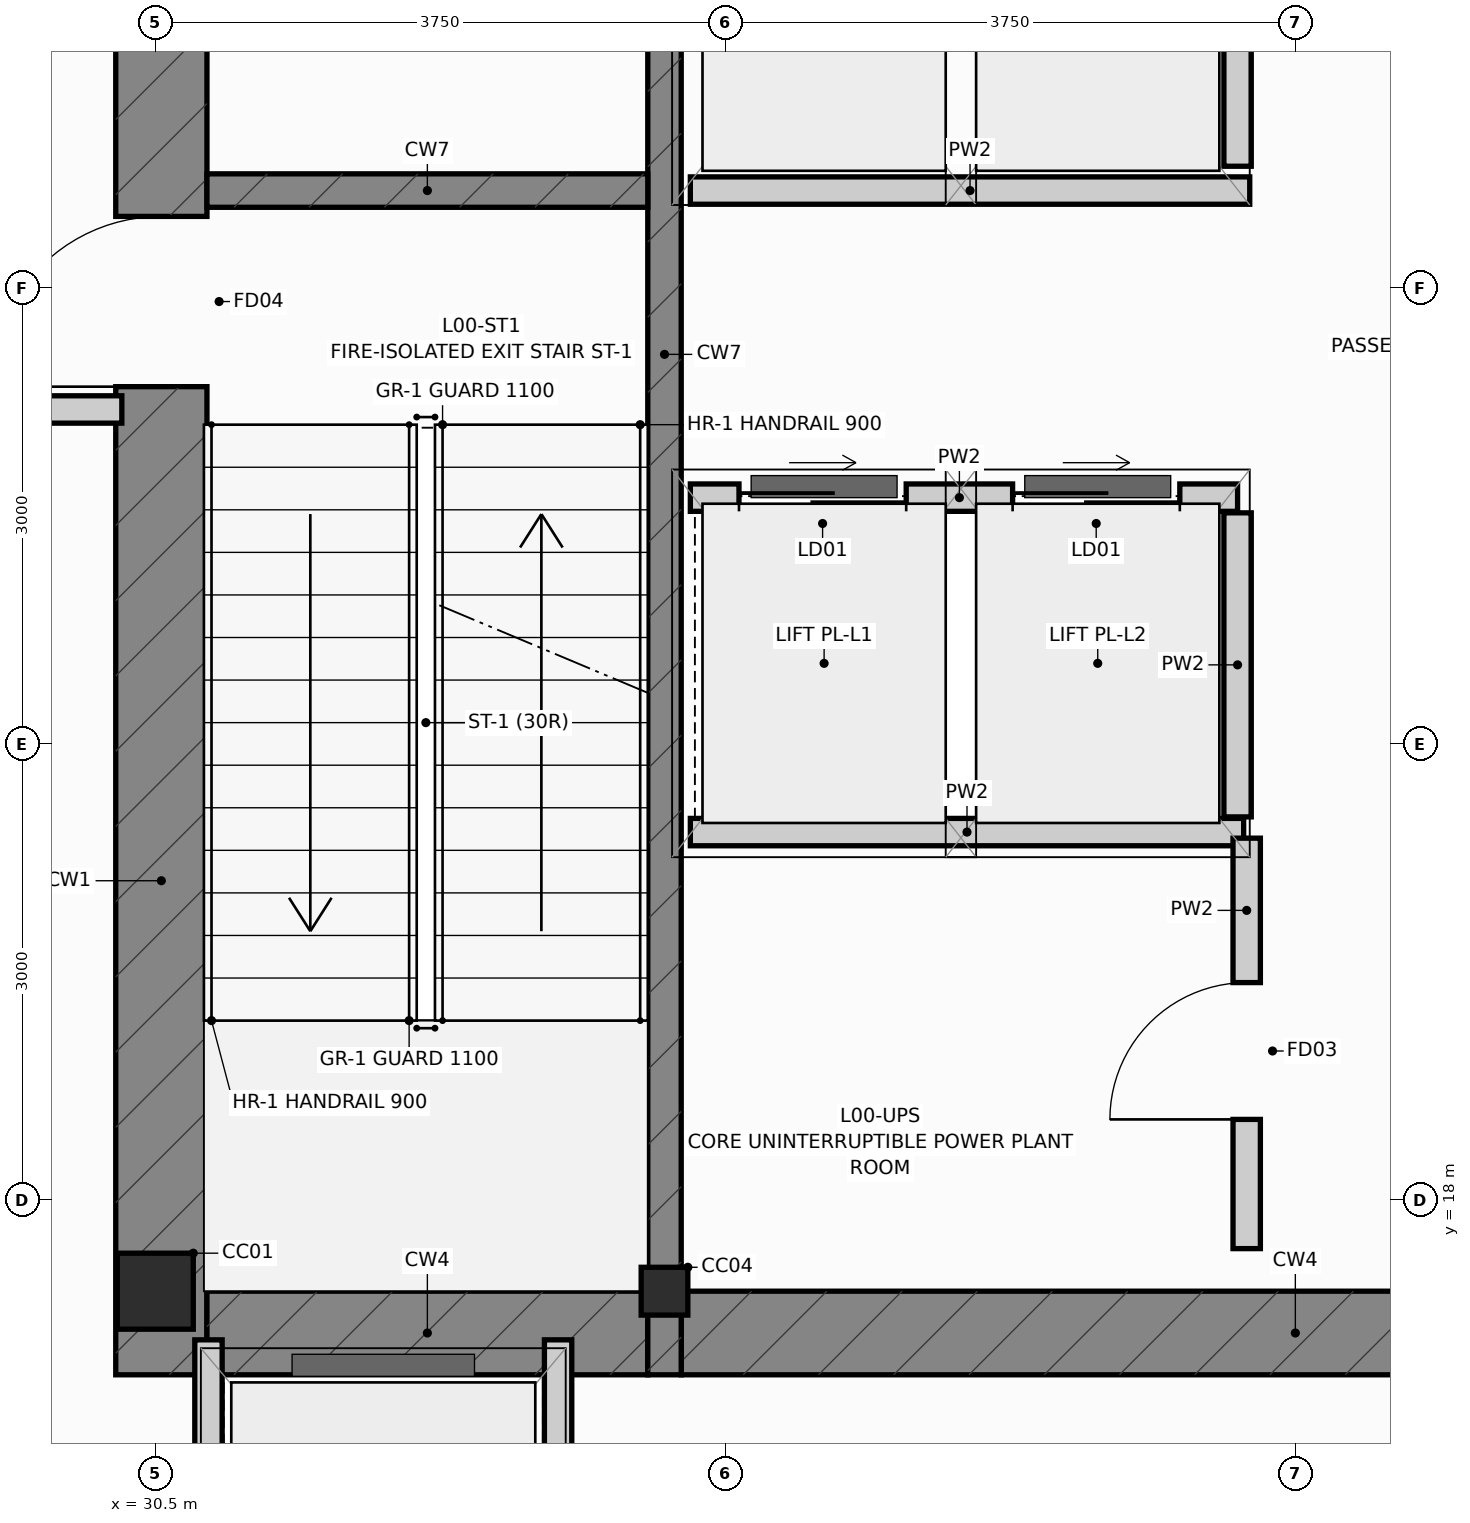
"""IFC4 building model, lengths in metres.
Left out: names, types, materials, properties, quantities, classifications, styles, units other than length and angle.
Written with IfcOpenShell. Run it as: python <this file> out.ifc"""

import sys

from ifc_helpers import new_model, si_unit, direction, frame, frame_2d, origin, origin_2d, place, context, subcontext, project, spatial, rectangle, i_section, extrude, source, transform, mapped, element, fill, save


model = new_model("IFC4")
c1 = context("Model", 3, precision=1e-05, world=origin(), true_north=direction((0.0, 1.0)))
c2 = subcontext(c1, "Body", "Model", "MODEL_VIEW")
j1 = project(units=[si_unit("LENGTHUNIT", "METRE"), si_unit("PLANEANGLEUNIT", "RADIAN")], contexts=[c1])
p1 = place(None, origin())
s1 = spatial("IfcSite", under=j1, at=p1, CompositionType="ELEMENT")
p2 = place(p1, origin())
s2 = spatial("IfcBuilding", under=s1, at=p2, CompositionType="ELEMENT")
p3 = place(p2, origin())
s3 = spatial("IfcBuildingStorey", under=s2, at=p3, CompositionType="ELEMENT", Elevation=0.0)
m1 = source(origin(), c2, "Body", "SweptSolid", [
    extrude(i_section(OverallWidth=0.5, OverallDepth=0.5, WebThickness=0.028, FlangeThickness=0.04, at=origin_2d()), origin(), (0.0, 0.0, 1.0), 5.4),
])
p4 = place(p3, frame((30.5, 17.4, 0.0), z_axis=(0.0, 0.0, 1.0), x_axis=(1.0, 0.0, 0.0)))
e1 = element("IfcColumn", 1, at=p4, inside=s3, PredefinedType="COLUMN", context=c2, shape_type="MappedRepresentation", body=[
    mapped(m1, transform((0.0, 0.0, 0.0), scale=1.0)),
])
m2 = source(origin(), c2, "Body", "SweptSolid", [
    extrude(i_section(OverallWidth=0.307, OverallDepth=0.315, WebThickness=0.012, FlangeThickness=0.019, at=origin_2d()), origin(), (0.0, 0.0, 1.0), 5.4),
])
p5 = place(p3, frame((33.85, 17.4, 0.0), z_axis=(0.0, 0.0, 1.0), x_axis=(1.0, 0.0, 0.0)))
e2 = element("IfcColumn", 2, at=p5, inside=s3, PredefinedType="COLUMN", context=c2, shape_type="MappedRepresentation", body=[
    mapped(m2, transform((0.0, 0.0, 0.0), scale=1.0)),
])
p6 = place(p3, frame((30.54, 16.85, 0.0), z_axis=(0.0, 0.0, 1.0), x_axis=(0.0, 1.0, 0.0)))
e3 = element("IfcWall", 3, at=p6, inside=s3, PredefinedType="SHEAR", context=c2, shape_type="SweptSolid", body=[
    extrude(rectangle(XDim=13.425, YDim=0.6, at=frame_2d((6.712, 0.0))), origin(), (0.0, 0.0, 1.0), 5.4),
])
p7 = place(p6, frame((6.5, 0.0, 0.0)))
e4 = element("IfcOpeningElement", 4, at=p7, cuts=e3, PredefinedType="OPENING", context=c2, shape_type="SweptSolid", body=[
    extrude(rectangle(XDim=1.12, YDim=2.15, at=frame_2d((0.56, 1.075))), frame((0.0, 0.312, 0.0), z_axis=(0.0, -1.0, 0.0), x_axis=(1.0, 0.0, 0.0)), (0.0, 0.0, 1.0), 0.624),
])
p8 = place(p6, frame((10.95, 0.0, 0.0)))
e5 = element("IfcOpeningElement", 5, at=p8, cuts=e3, PredefinedType="OPENING", context=c2, shape_type="SweptSolid", body=[
    extrude(rectangle(XDim=1.2, YDim=2.2, at=frame_2d((0.6, 1.1))), frame((0.0, 0.312, 0.0), z_axis=(0.0, -1.0, 0.0), x_axis=(1.0, 0.0, 0.0)), (0.0, 0.0, 1.0), 0.624),
])
p9 = place(p3, frame((30.84, 17.125, 0.0), z_axis=(0.0, 0.0, 1.0), x_axis=(1.0, 0.0, 0.0)))
e6 = element("IfcWall", 6, at=p9, inside=s3, PredefinedType="SHEAR", context=c2, shape_type="SweptSolid", body=[
    extrude(rectangle(XDim=2.9, YDim=0.55, at=frame_2d((1.45, 0.0))), origin(), (0.0, 0.0, 1.0), 5.4),
])
p10 = place(p3, frame((33.96, 17.125, 0.0), z_axis=(0.0, 0.0, 1.0), x_axis=(1.0, 0.0, 0.0)))
e7 = element("IfcWall", 7, at=p10, inside=s3, PredefinedType="SHEAR", context=c2, shape_type="SweptSolid", body=[
    extrude(rectangle(XDim=8.08, YDim=0.55, at=frame_2d((4.04, 0.0))), origin(), (0.0, 0.0, 1.0), 5.4),
])
p11 = place(p3, frame((33.85, 16.85, 0.0), z_axis=(0.0, 0.0, 1.0), x_axis=(0.0, 1.0, 0.0)))
e8 = element("IfcWall", 8, at=p11, inside=s3, PredefinedType="SHEAR", context=c2, shape_type="SweptSolid", body=[
    extrude(rectangle(XDim=13.425, YDim=0.22, at=frame_2d((6.712, 0.0))), origin(), (0.0, 0.0, 1.0), 5.4),
])
p12 = place(p3, frame((30.84, 24.64, 0.0), z_axis=(0.0, 0.0, 1.0), x_axis=(1.0, 0.0, 0.0)))
e9 = element("IfcWall", 9, at=p12, inside=s3, PredefinedType="SHEAR", context=c2, shape_type="SweptSolid", body=[
    extrude(rectangle(XDim=2.9, YDim=0.22, at=frame_2d((1.45, 0.0))), origin(), (0.0, 0.0, 1.0), 5.4),
])
p13 = place(p3, frame((30.85, 14.42, 0.0), z_axis=(0.0, 0.0, 1.0), x_axis=(0.0, 1.0, 0.0)))
e10 = element("IfcWall", 10, at=p13, inside=s3, PredefinedType="PARTITIONING", context=c2, shape_type="SweptSolid", body=[
    extrude(rectangle(XDim=2.66, YDim=0.18, at=frame_2d((1.33, 0.0))), origin(), (0.0, 0.0, 1.0), 4.453),
])
p14 = place(p3, frame((33.15, 14.42, 0.0), z_axis=(0.0, 0.0, 1.0), x_axis=(0.0, 1.0, 0.0)))
e11 = element("IfcWall", 11, at=p14, inside=s3, PredefinedType="PARTITIONING", context=c2, shape_type="SweptSolid", body=[
    extrude(rectangle(XDim=2.66, YDim=0.18, at=frame_2d((1.33, 0.0))), origin(), (0.0, 0.0, 1.0), 5.08),
])
p15 = place(p3, frame((34.02, 22.62, 0.0), z_axis=(0.0, 0.0, 1.0), x_axis=(1.0, 0.0, 0.0)))
e12 = element("IfcWall", 12, at=p15, inside=s3, PredefinedType="PARTITIONING", context=c2, shape_type="SweptSolid", body=[
    extrude(rectangle(XDim=3.6, YDim=0.18, at=frame_2d((1.8, 0.0))), origin(), (0.0, 0.0, 1.0), 5.08),
])
p16 = place(p15, frame((0.32, 0.0, 0.0)))
e13 = element("IfcOpeningElement", 13, at=p16, cuts=e12, PredefinedType="OPENING", context=c2, shape_type="SweptSolid", body=[
    extrude(rectangle(XDim=1.1, YDim=2.2, at=frame_2d((0.55, 1.1))), frame((0.0, 0.102, 0.0), z_axis=(0.0, -1.0, 0.0), x_axis=(1.0, 0.0, 0.0)), (0.0, 0.0, 1.0), 0.204),
])
p17 = place(p15, frame((2.12, 0.0, 0.0)))
e14 = element("IfcOpeningElement", 14, at=p17, cuts=e12, PredefinedType="OPENING", context=c2, shape_type="SweptSolid", body=[
    extrude(rectangle(XDim=1.1, YDim=2.2, at=frame_2d((0.55, 1.1))), frame((0.0, 0.102, 0.0), z_axis=(0.0, -1.0, 0.0), x_axis=(1.0, 0.0, 0.0)), (0.0, 0.0, 1.0), 0.204),
])
for number, where, z_axis, x_axis in (
    (15, (37.62, 20.52, 0.0), (0.0, 0.0, 1.0), (0.0, 1.0, 0.0)),
    (16, (37.62, 24.8, 0.0), (0.0, 0.0, 1.0), (0.0, 1.0, 0.0)),
):
    element("IfcWall", number, at=place(p3, frame(where, z_axis=z_axis, x_axis=x_axis)), inside=s3, PredefinedType="PARTITIONING", context=c2, shape_type="SweptSolid", body=[
        extrude(rectangle(XDim=2.0, YDim=0.18, at=frame_2d((1.0, 0.0))), origin(), (0.0, 0.0, 1.0), 5.08),
    ])
p18 = place(p3, frame((34.02, 24.64, 0.0), z_axis=(0.0, 0.0, 1.0), x_axis=(1.0, 0.0, 0.0)))
e17 = element("IfcWall", 17, at=p18, inside=s3, PredefinedType="PARTITIONING", context=c2, shape_type="SweptSolid", body=[
    extrude(rectangle(XDim=3.68, YDim=0.18, at=frame_2d((1.84, 0.0))), origin(), (0.0, 0.0, 1.0), 5.08),
])
p19 = place(p3, frame((27.52, 23.2, 0.0), z_axis=(0.0, 0.0, 1.0), x_axis=(1.0, 0.0, 0.0)))
e18 = element("IfcWall", 18, at=p19, inside=s3, PredefinedType="PARTITIONING", context=c2, shape_type="SweptSolid", body=[
    extrude(rectangle(XDim=2.76, YDim=0.18, at=frame_2d((1.38, 0.0))), origin(), (0.0, 0.0, 1.0), 5.08),
])
p20 = place(p3, frame((34.02, 20.42, 0.0), z_axis=(0.0, 0.0, 1.0), x_axis=(1.0, 0.0, 0.0)))
e19 = element("IfcWall", 19, at=p20, inside=s3, PredefinedType="PARTITIONING", context=c2, shape_type="SweptSolid", body=[
    extrude(rectangle(XDim=3.64, YDim=0.18, at=frame_2d((1.82, 0.0))), origin(), (0.0, 0.0, 1.0), 5.08),
])
p21 = place(p3, frame((37.68, 17.68, 0.0), z_axis=(0.0, 0.0, 1.0), x_axis=(0.0, 1.0, 0.0)))
e20 = element("IfcWall", 20, at=p21, inside=s3, PredefinedType="PARTITIONING", context=c2, shape_type="SweptSolid", body=[
    extrude(rectangle(XDim=2.7, YDim=0.18, at=frame_2d((1.35, 0.0))), origin(), (0.0, 0.0, 1.0), 5.08),
])
p22 = place(p21, frame((0.85, 0.0, 0.0)))
e21 = element("IfcOpeningElement", 21, at=p22, cuts=e20, PredefinedType="OPENING", context=c2, shape_type="SweptSolid", body=[
    extrude(rectangle(XDim=0.9, YDim=2.1, at=frame_2d((0.45, 1.05))), frame((0.0, 0.102, 0.0), z_axis=(0.0, -1.0, 0.0), x_axis=(1.0, 0.0, 0.0)), (0.0, 0.0, 1.0), 0.204),
])
p23 = place(p7, origin())
e22 = element("IfcDoor", 22, at=p23, inside=s3, OperationType="SINGLE_SWING_LEFT", PredefinedType="DOOR", context=c2, shape_type="SweptSolid", body=[
    extrude(rectangle(XDim=1.12, YDim=2.15, at=frame_2d((0.56, 1.075))), frame((0.0, 0.025, 0.0), z_axis=(0.0, -1.0, 0.0), x_axis=(1.0, 0.0, 0.0)), (0.0, 0.0, 1.0), 0.05),
])
fill(e4, e22)
p24 = place(p16, origin())
e23 = element("IfcDoor", 23, at=p24, inside=s3, OperationType="SLIDING_TO_LEFT", PredefinedType="DOOR", context=c2, shape_type="SweptSolid", body=[
    extrude(rectangle(XDim=1.1, YDim=2.2, at=frame_2d((0.55, 1.1))), frame((0.0, 0.025, 0.0), z_axis=(0.0, -1.0, 0.0), x_axis=(1.0, 0.0, 0.0)), (0.0, 0.0, 1.0), 0.05),
])
fill(e13, e23)
p25 = place(p17, origin())
e24 = element("IfcDoor", 24, at=p25, inside=s3, OperationType="SLIDING_TO_RIGHT", PredefinedType="DOOR", context=c2, shape_type="SweptSolid", body=[
    extrude(rectangle(XDim=1.1, YDim=2.2, at=frame_2d((0.55, 1.1))), frame((0.0, 0.025, 0.0), z_axis=(0.0, -1.0, 0.0), x_axis=(1.0, 0.0, 0.0)), (0.0, 0.0, 1.0), 0.05),
])
fill(e14, e24)
p26 = place(p22, origin())
e25 = element("IfcDoor", 25, at=p26, inside=s3, OperationType="SINGLE_SWING_LEFT", PredefinedType="DOOR", context=c2, shape_type="SweptSolid", body=[
    extrude(rectangle(XDim=0.9, YDim=2.1, at=frame_2d((0.45, 1.05))), frame((0.0, 0.025, 0.0), z_axis=(0.0, -1.0, 0.0), x_axis=(1.0, 0.0, 0.0)), (0.0, 0.0, 1.0), 0.05),
])
fill(e21, e25)
save(model, sys.argv[1])
